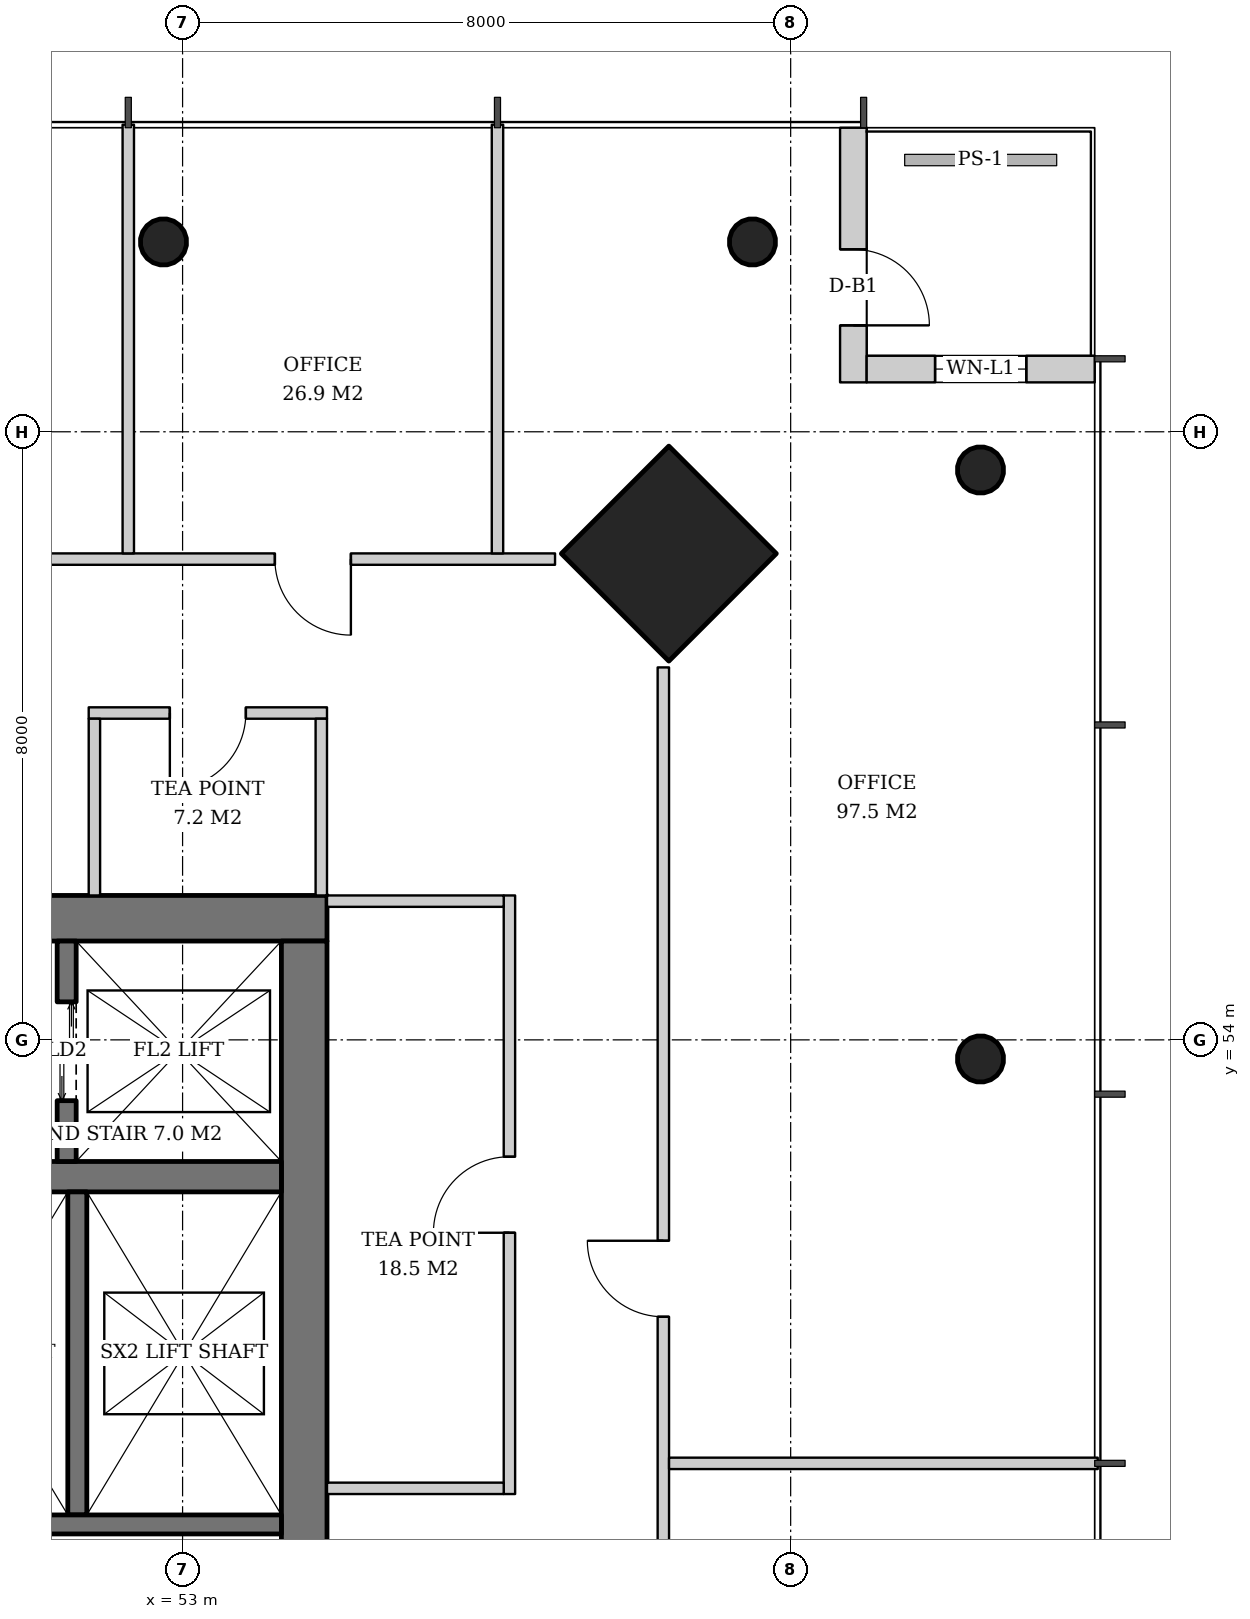
"""IFC4 building model, lengths in metres.
Left out: names, types, materials, properties, quantities, classifications, styles, units other than length and angle.
Written with IfcOpenShell. Run it as: python <this file> out.ifc"""

import sys

from ifc_helpers import new_model, si_unit, direction, frame, frame_2d, origin, origin_2d, place, context, subcontext, project, spatial, rectangle, hollow_circle, extrude, element, fill, save


model = new_model("IFC4")
c1 = context("Model", 3, precision=1e-05, world=origin(), true_north=direction((0.0, 1.0)))
c2 = subcontext(c1, "Body", "Model", "MODEL_VIEW")
j1 = project(units=[si_unit("LENGTHUNIT", "METRE"), si_unit("PLANEANGLEUNIT", "RADIAN")], contexts=[c1])
p1 = place(None, origin())
s1 = spatial("IfcSite", under=j1, at=p1, CompositionType="ELEMENT")
p2 = place(p1, origin())
s2 = spatial("IfcBuilding", under=s1, at=p2, CompositionType="ELEMENT")
p3 = place(p2, frame((0.0, 0.0, 192.0)))
s3 = spatial("IfcBuildingStorey", under=s2, at=p3, CompositionType="ELEMENT", Elevation=192.0)
p4 = place(p3, frame((59.436, 60.436, 0.0), z_axis=(-0.031962158256, -0.031962158256, 0.998977898093), x_axis=(0.707106781187, -0.707106781187, 0.0)))
e1 = element("IfcColumn", 1, at=p4, inside=s3, PredefinedType="COLUMN", context=c2, shape_type="SweptSolid", body=[
    extrude(rectangle(XDim=2.0, YDim=2.0, at=origin_2d()), origin(), (0.0, 0.0, 1.0), 3.804),
])
p5 = place(p3, frame((63.536, 61.536, 0.0), z_axis=(-0.031898107953, -0.031898107953, 0.998981992539), x_axis=(0.707106781187, -0.707106781187, 0.0)))
e2 = element("IfcColumn", 2, at=p5, inside=s3, PredefinedType="COLUMN", context=c2, shape_type="SweptSolid", body=[
    extrude(hollow_circle(Radius=0.305, WallThickness=0.025, at=origin_2d()), origin(), (0.0, 0.0, 1.0), 3.804),
])
p6 = place(p3, frame((63.536, 53.768, 0.0), z_axis=(-0.031910269556, -0.015987237665, 0.999362868496), x_axis=(0.447933021895, -0.894067115991, 0.0)))
e3 = element("IfcColumn", 3, at=p6, inside=s3, PredefinedType="COLUMN", context=c2, shape_type="SweptSolid", body=[
    extrude(hollow_circle(Radius=0.305, WallThickness=0.025, at=origin_2d()), origin(), (0.0, 0.0, 1.0), 3.802),
])
p7 = place(p3, frame((60.536, 64.536, 0.0), z_axis=(-0.031898107953, -0.031898107953, 0.998981992539), x_axis=(0.707106781187, -0.707106781187, 0.0)))
e4 = element("IfcColumn", 4, at=p7, inside=s3, PredefinedType="COLUMN", context=c2, shape_type="SweptSolid", body=[
    extrude(hollow_circle(Radius=0.305, WallThickness=0.025, at=origin_2d()), origin(), (0.0, 0.0, 1.0), 3.804),
])
p8 = place(p3, frame((52.768, 64.536, 0.0), z_axis=(-0.015987237665, -0.031910269556, 0.999362868496), x_axis=(0.894067115991, -0.447933021895, 0.0)))
e5 = element("IfcColumn", 5, at=p8, inside=s3, PredefinedType="COLUMN", context=c2, shape_type="SweptSolid", body=[
    extrude(hollow_circle(Radius=0.305, WallThickness=0.025, at=origin_2d()), origin(), (0.0, 0.0, 1.0), 3.802),
])
p9 = place(p3, frame((35.1, 55.6, 0.0), z_axis=(0.0, 0.0, 1.0), x_axis=(1.0, 0.0, 0.0)))
e6 = element("IfcWall", 6, at=p9, inside=s3, PredefinedType="SHEAR", context=c2, shape_type="SweptSolid", body=[
    extrude(rectangle(XDim=19.8, YDim=0.6, at=frame_2d((9.9, 0.0))), origin(), (0.0, 0.0, 1.0), 3.8),
])
p10 = place(p9, frame((14.54, 0.0, 0.0)))
e7 = element("IfcOpeningElement", 7, at=p10, cuts=e6, PredefinedType="OPENING", context=c2, shape_type="SweptSolid", body=[
    extrude(rectangle(XDim=1.0, YDim=2.1, at=frame_2d((0.5, 1.05))), frame((0.0, 0.31, 0.0), z_axis=(0.0, -1.0, 0.0), x_axis=(1.0, 0.0, 0.0)), (0.0, 0.0, 1.0), 0.62),
])
p11 = place(p9, frame((1.396, 0.0, 0.0)))
e8 = element("IfcOpeningElement", 8, at=p11, cuts=e6, PredefinedType="OPENING", context=c2, shape_type="SweptSolid", body=[
    extrude(rectangle(XDim=1.0, YDim=2.1, at=frame_2d((0.5, 1.05))), frame((0.0, 0.31, 0.0), z_axis=(0.0, -1.0, 0.0), x_axis=(1.0, 0.0, 0.0)), (0.0, 0.0, 1.0), 0.62),
])
p12 = place(p9, frame((3.448, 0.0, 0.0)))
e9 = element("IfcOpeningElement", 9, at=p12, cuts=e6, PredefinedType="OPENING", context=c2, shape_type="SweptSolid", body=[
    extrude(rectangle(XDim=1.0, YDim=2.1, at=frame_2d((0.5, 1.05))), frame((0.0, 0.31, 0.0), z_axis=(0.0, -1.0, 0.0), x_axis=(1.0, 0.0, 0.0)), (0.0, 0.0, 1.0), 0.62),
])
p13 = place(p3, frame((54.6, 36.7, 0.0), z_axis=(0.0, 0.0, 1.0), x_axis=(0.0, 1.0, 0.0)))
e10 = element("IfcWall", 10, at=p13, inside=s3, PredefinedType="SHEAR", context=c2, shape_type="SweptSolid", body=[
    extrude(rectangle(XDim=18.6, YDim=0.6, at=frame_2d((9.3, 0.0))), origin(), (0.0, 0.0, 1.0), 3.8),
])
p14 = place(p13, frame((8.4, 0.0, 0.0)))
e11 = element("IfcOpeningElement", 11, at=p14, cuts=e10, PredefinedType="OPENING", context=c2, shape_type="SweptSolid", body=[
    extrude(rectangle(XDim=1.8, YDim=2.4, at=frame_2d((0.9, 1.2))), frame((0.0, 0.31, 0.0), z_axis=(0.0, -1.0, 0.0), x_axis=(1.0, 0.0, 0.0)), (0.0, 0.0, 1.0), 0.62),
])
p15 = place(p3, frame((35.7, 52.2, 0.0), z_axis=(0.0, 0.0, 1.0), x_axis=(1.0, 0.0, 0.0)))
e12 = element("IfcWall", 12, at=p15, inside=s3, PredefinedType="SHEAR", context=c2, shape_type="SweptSolid", body=[
    extrude(rectangle(XDim=18.6, YDim=0.4, at=frame_2d((9.3, 0.0))), origin(), (0.0, 0.0, 1.0), 3.8),
])
p16 = place(p3, frame((61.825, 66.0, 0.0), z_axis=(0.0, 0.0, 1.0), x_axis=(0.0, -1.0, 0.0)))
e13 = element("IfcWall", 13, at=p16, inside=s3, PredefinedType="SOLIDWALL", context=c2, shape_type="SweptSolid", body=[
    extrude(rectangle(XDim=3.35, YDim=0.35, at=frame_2d((1.675, 0.0))), origin(), (0.0, 0.0, 1.0), 3.62),
])
p17 = place(p16, frame((1.6, 0.0, 0.0)))
e14 = element("IfcOpeningElement", 14, at=p17, cuts=e13, PredefinedType="OPENING", context=c2, shape_type="SweptSolid", body=[
    extrude(rectangle(XDim=1.0, YDim=2.4, at=frame_2d((0.5, 1.2))), frame((0.0, 0.185, 0.0), z_axis=(0.0, -1.0, 0.0), x_axis=(1.0, 0.0, 0.0)), (0.0, 0.0, 1.0), 0.37),
])
p18 = place(p3, frame((62.0, 62.825, 0.0), z_axis=(0.0, 0.0, 1.0), x_axis=(1.0, 0.0, 0.0)))
e15 = element("IfcWall", 15, at=p18, inside=s3, PredefinedType="SOLIDWALL", context=c2, shape_type="SweptSolid", body=[
    extrude(rectangle(XDim=3.0, YDim=0.35, at=frame_2d((1.5, 0.0))), origin(), (0.0, 0.0, 1.0), 3.62),
])
p19 = place(p18, frame((0.9, 0.0, 0.6)))
e16 = element("IfcOpeningElement", 16, at=p19, cuts=e15, PredefinedType="OPENING", context=c2, shape_type="SweptSolid", body=[
    extrude(rectangle(XDim=1.2, YDim=2.55, at=frame_2d((0.6, 1.275))), frame((0.0, 0.185, 0.0), z_axis=(0.0, -1.0, 0.0), x_axis=(1.0, 0.0, 0.0)), (0.0, 0.0, 1.0), 0.37),
])
p20 = place(p3, frame((51.475, 52.4, 0.0), z_axis=(0.0, 0.0, 1.0), x_axis=(0.0, 1.0, 0.0)))
e17 = element("IfcWall", 17, at=p20, inside=s3, PredefinedType="SHEAR", context=c2, shape_type="SweptSolid", body=[
    extrude(rectangle(XDim=2.9, YDim=0.25, at=frame_2d((1.45, 0.0))), origin(), (0.0, 0.0, 1.0), 3.8),
])
p21 = place(p20, frame((0.8, 0.0, 0.0)))
e18 = element("IfcOpeningElement", 18, at=p21, cuts=e17, PredefinedType="OPENING", context=c2, shape_type="SweptSolid", body=[
    extrude(rectangle(XDim=1.3, YDim=2.2, at=frame_2d((0.65, 1.1))), frame((0.0, 0.135, 0.0), z_axis=(0.0, -1.0, 0.0), x_axis=(1.0, 0.0, 0.0)), (0.0, 0.0, 1.0), 0.27),
])
p22 = place(p3, frame((51.615, 47.75, 0.0), z_axis=(0.0, 0.0, 1.0), x_axis=(0.0, 1.0, 0.0)))
e19 = element("IfcWall", 19, at=p22, inside=s3, PredefinedType="SHEAR", context=c2, shape_type="SweptSolid", body=[
    extrude(rectangle(XDim=4.25, YDim=0.25, at=frame_2d((2.125, 0.0))), origin(), (0.0, 0.0, 1.0), 3.8),
])
p23 = place(p3, frame((48.93, 47.625, 0.0), z_axis=(0.0, 0.0, 1.0), x_axis=(1.0, 0.0, 0.0)))
e20 = element("IfcWall", 20, at=p23, inside=s3, PredefinedType="SHEAR", context=c2, shape_type="SweptSolid", body=[
    extrude(rectangle(XDim=5.37, YDim=0.25, at=frame_2d((2.685, 0.0))), origin(), (0.0, 0.0, 1.0), 3.8),
])
p24 = place(p3, frame((57.3, 48.025, 0.0), z_axis=(0.0, 0.0, 1.0), x_axis=(0.0, 1.0, 0.0)))
e21 = element("IfcWall", 21, at=p24, inside=s3, PredefinedType="PARTITIONING", context=c2, shape_type="SweptSolid", body=[
    extrude(rectangle(XDim=7.875, YDim=0.15, at=frame_2d((3.938, 0.0))), origin(), (0.0, 0.0, 1.0), 2.867),
])
p25 = place(p24, frame((3.438, 0.0, 0.0)))
e22 = element("IfcOpeningElement", 22, at=p25, cuts=e21, PredefinedType="OPENING", context=c2, shape_type="SweptSolid", body=[
    extrude(rectangle(XDim=1.0, YDim=2.1, at=frame_2d((0.5, 1.05))), frame((0.0, 0.085, 0.0), z_axis=(0.0, -1.0, 0.0), x_axis=(1.0, 0.0, 0.0)), (0.0, 0.0, 1.0), 0.17),
])
for number, where, z_axis, x_axis in (
    (23, (54.9, 48.1, 0.0), (0.0, 0.0, 1.0), (1.0, 0.0, 0.0)),
    (24, (54.9, 55.825, 0.0), (0.0, 0.0, 1.0), (1.0, 0.0, 0.0)),
):
    element("IfcWall", number, at=place(p3, frame(where, z_axis=z_axis, x_axis=x_axis)), inside=s3, PredefinedType="PARTITIONING", context=c2, shape_type="SweptSolid", body=[
        extrude(rectangle(XDim=2.325, YDim=0.15, at=frame_2d((1.163, 0.0))), origin(), (0.0, 0.0, 1.0), 3.62),
    ])
p26 = place(p3, frame((54.9, 58.3, 0.0), z_axis=(0.0, 0.0, 1.0), x_axis=(-1.0, 0.0, 0.0)))
e25 = element("IfcWall", 25, at=p26, inside=s3, PredefinedType="PARTITIONING", context=c2, shape_type="SweptSolid", body=[
    extrude(rectangle(XDim=3.135, YDim=0.15, at=frame_2d((1.567, 0.0))), origin(), (0.0, 0.0, 1.0), 2.92),
])
p27 = place(p26, frame((1.067, 0.0, 0.0)))
e26 = element("IfcOpeningElement", 26, at=p27, cuts=e25, PredefinedType="OPENING", context=c2, shape_type="SweptSolid", body=[
    extrude(rectangle(XDim=1.0, YDim=2.1, at=frame_2d((0.5, 1.05))), frame((0.0, 0.085, 0.0), z_axis=(0.0, -1.0, 0.0), x_axis=(1.0, 0.0, 0.0)), (0.0, 0.0, 1.0), 0.17),
])
p28 = place(p3, frame((54.825, 55.9, 0.0), z_axis=(0.0, 0.0, 1.0), x_axis=(0.0, 1.0, 0.0)))
e27 = element("IfcWall", 27, at=p28, inside=s3, PredefinedType="PARTITIONING", context=c2, shape_type="SweptSolid", body=[
    extrude(rectangle(XDim=2.325, YDim=0.15, at=frame_2d((1.163, 0.0))), origin(), (0.0, 0.0, 1.0), 2.867),
])
p29 = place(p3, frame((51.84, 55.9, 0.0), z_axis=(0.0, 0.0, 1.0), x_axis=(0.0, 1.0, 0.0)))
e28 = element("IfcWall", 28, at=p29, inside=s3, PredefinedType="PARTITIONING", context=c2, shape_type="SweptSolid", body=[
    extrude(rectangle(XDim=2.325, YDim=0.15, at=frame_2d((1.163, 0.0))), origin(), (0.0, 0.0, 1.0), 3.62),
])
p30 = place(p3, frame((59.325, 33.1, 0.0), z_axis=(0.0, 0.0, 1.0), x_axis=(0.0, 1.0, 0.0)))
e29 = element("IfcWall", 29, at=p30, inside=s3, PredefinedType="PARTITIONING", context=c2, shape_type="SweptSolid", body=[
    extrude(rectangle(XDim=25.8, YDim=0.15, at=frame_2d((12.9, 0.0))), origin(), (0.0, 0.0, 1.0), 2.867),
])
p31 = place(p30, frame((2.686, 0.0, 0.0)))
e30 = element("IfcOpeningElement", 30, at=p31, cuts=e29, PredefinedType="OPENING", context=c2, shape_type="SweptSolid", body=[
    extrude(rectangle(XDim=1.0, YDim=2.1, at=frame_2d((0.5, 1.05))), frame((0.0, 0.085, 0.0), z_axis=(0.0, -1.0, 0.0), x_axis=(1.0, 0.0, 0.0)), (0.0, 0.0, 1.0), 0.17),
])
p32 = place(p30, frame((7.543, 0.0, 0.0)))
e31 = element("IfcOpeningElement", 31, at=p32, cuts=e29, PredefinedType="OPENING", context=c2, shape_type="SweptSolid", body=[
    extrude(rectangle(XDim=1.0, YDim=2.1, at=frame_2d((0.5, 1.05))), frame((0.0, 0.085, 0.0), z_axis=(0.0, -1.0, 0.0), x_axis=(1.0, 0.0, 0.0)), (0.0, 0.0, 1.0), 0.17),
])
p33 = place(p30, frame((12.4, 0.0, 0.0)))
e32 = element("IfcOpeningElement", 32, at=p33, cuts=e29, PredefinedType="OPENING", context=c2, shape_type="SweptSolid", body=[
    extrude(rectangle(XDim=1.0, YDim=2.1, at=frame_2d((0.5, 1.05))), frame((0.0, 0.085, 0.0), z_axis=(0.0, -1.0, 0.0), x_axis=(1.0, 0.0, 0.0)), (0.0, 0.0, 1.0), 0.17),
])
p34 = place(p30, frame((17.257, 0.0, 0.0)))
e33 = element("IfcOpeningElement", 33, at=p34, cuts=e29, PredefinedType="OPENING", context=c2, shape_type="SweptSolid", body=[
    extrude(rectangle(XDim=1.0, YDim=2.1, at=frame_2d((0.5, 1.05))), frame((0.0, 0.085, 0.0), z_axis=(0.0, -1.0, 0.0), x_axis=(1.0, 0.0, 0.0)), (0.0, 0.0, 1.0), 0.17),
])
p35 = place(p3, frame((59.4, 48.428, 0.0), z_axis=(0.0, 0.0, 1.0), x_axis=(1.0, 0.0, 0.0)))
e34 = element("IfcWall", 34, at=p35, inside=s3, PredefinedType="PARTITIONING", context=c2, shape_type="SweptSolid", body=[
    extrude(rectangle(XDim=5.64, YDim=0.15, at=frame_2d((2.82, 0.0))), origin(), (0.0, 0.0, 1.0), 2.867),
])
p36 = place(p3, frame((57.9, 60.325, 0.0), z_axis=(0.0, 0.0, 1.0), x_axis=(-1.0, 0.0, 0.0)))
e35 = element("IfcWall", 35, at=p36, inside=s3, PredefinedType="PARTITIONING", context=c2, shape_type="SweptSolid", body=[
    extrude(rectangle(XDim=25.8, YDim=0.15, at=frame_2d((12.9, 0.0))), origin(), (0.0, 0.0, 1.0), 2.867),
])
p37 = place(p36, frame((2.686, 0.0, 0.0)))
e36 = element("IfcOpeningElement", 36, at=p37, cuts=e35, PredefinedType="OPENING", context=c2, shape_type="SweptSolid", body=[
    extrude(rectangle(XDim=1.0, YDim=2.1, at=frame_2d((0.5, 1.05))), frame((0.0, 0.085, 0.0), z_axis=(0.0, -1.0, 0.0), x_axis=(1.0, 0.0, 0.0)), (0.0, 0.0, 1.0), 0.17),
])
p38 = place(p36, frame((7.543, 0.0, 0.0)))
e37 = element("IfcOpeningElement", 37, at=p38, cuts=e35, PredefinedType="OPENING", context=c2, shape_type="SweptSolid", body=[
    extrude(rectangle(XDim=1.0, YDim=2.1, at=frame_2d((0.5, 1.05))), frame((0.0, 0.085, 0.0), z_axis=(0.0, -1.0, 0.0), x_axis=(1.0, 0.0, 0.0)), (0.0, 0.0, 1.0), 0.17),
])
p39 = place(p36, frame((12.4, 0.0, 0.0)))
e38 = element("IfcOpeningElement", 38, at=p39, cuts=e35, PredefinedType="OPENING", context=c2, shape_type="SweptSolid", body=[
    extrude(rectangle(XDim=1.0, YDim=2.1, at=frame_2d((0.5, 1.05))), frame((0.0, 0.085, 0.0), z_axis=(0.0, -1.0, 0.0), x_axis=(1.0, 0.0, 0.0)), (0.0, 0.0, 1.0), 0.17),
])
p40 = place(p36, frame((17.257, 0.0, 0.0)))
e39 = element("IfcOpeningElement", 39, at=p40, cuts=e35, PredefinedType="OPENING", context=c2, shape_type="SweptSolid", body=[
    extrude(rectangle(XDim=1.0, YDim=2.1, at=frame_2d((0.5, 1.05))), frame((0.0, 0.085, 0.0), z_axis=(0.0, -1.0, 0.0), x_axis=(1.0, 0.0, 0.0)), (0.0, 0.0, 1.0), 0.17),
])
for number, where, z_axis, x_axis in (
    (40, (57.143, 60.4, 0.0), (0.0, 0.0, 1.0), (0.0, 1.0, 0.0)),
    (41, (52.286, 60.4, 0.0), (0.0, 0.0, 1.0), (0.0, 1.0, 0.0)),
):
    element("IfcWall", number, at=place(p3, frame(where, z_axis=z_axis, x_axis=x_axis)), inside=s3, PredefinedType="PARTITIONING", context=c2, shape_type="SweptSolid", body=[
        extrude(rectangle(XDim=5.64, YDim=0.15, at=frame_2d((2.82, 0.0))), origin(), (0.0, 0.0, 1.0), 3.12),
    ])
p41 = place(p17, origin())
e42 = element("IfcDoor", 42, at=p41, inside=s3, OperationType="SINGLE_SWING_RIGHT", PredefinedType="DOOR", context=c2, shape_type="SweptSolid", body=[
    extrude(rectangle(XDim=1.0, YDim=2.4, at=frame_2d((0.5, 1.2))), frame((0.0, 0.025, 0.0), z_axis=(0.0, -1.0, 0.0), x_axis=(1.0, 0.0, 0.0)), (0.0, 0.0, 1.0), 0.05),
])
fill(e14, e42)
p42 = place(p19, origin())
e43 = element("IfcWindow", 43, at=p42, inside=s3, PartitioningType="SINGLE_PANEL", PredefinedType="WINDOW", context=c2, shape_type="SweptSolid", body=[
    extrude(rectangle(XDim=1.2, YDim=2.55, at=frame_2d((0.6, 1.275))), frame((0.0, 0.03, 0.0), z_axis=(0.0, -1.0, 0.0), x_axis=(1.0, 0.0, 0.0)), (0.0, 0.0, 1.0), 0.06),
])
fill(e16, e43)
p43 = place(p21, origin())
e44 = element("IfcDoor", 44, at=p43, inside=s3, OperationType="DOUBLE_DOOR_SLIDING", PredefinedType="DOOR", context=c2, shape_type="SweptSolid", body=[
    extrude(rectangle(XDim=1.3, YDim=2.2, at=frame_2d((0.65, 1.1))), frame((0.0, 0.025, 0.0), z_axis=(0.0, -1.0, 0.0), x_axis=(1.0, 0.0, 0.0)), (0.0, 0.0, 1.0), 0.05),
])
fill(e18, e44)
p44 = place(p25, origin())
e45 = element("IfcDoor", 45, at=p44, inside=s3, OperationType="SINGLE_SWING_LEFT", PredefinedType="DOOR", context=c2, shape_type="SweptSolid", body=[
    extrude(rectangle(XDim=1.0, YDim=2.1, at=frame_2d((0.5, 1.05))), frame((0.0, 0.025, 0.0), z_axis=(0.0, -1.0, 0.0), x_axis=(1.0, 0.0, 0.0)), (0.0, 0.0, 1.0), 0.05),
])
fill(e22, e45)
p45 = place(p27, origin())
e46 = element("IfcDoor", 46, at=p45, inside=s3, OperationType="SINGLE_SWING_RIGHT", PredefinedType="DOOR", context=c2, shape_type="SweptSolid", body=[
    extrude(rectangle(XDim=1.0, YDim=2.1, at=frame_2d((0.5, 1.05))), frame((0.0, 0.025, 0.0), z_axis=(0.0, -1.0, 0.0), x_axis=(1.0, 0.0, 0.0)), (0.0, 0.0, 1.0), 0.05),
])
fill(e26, e46)
p46 = place(p34, origin())
e47 = element("IfcDoor", 47, at=p46, inside=s3, OperationType="SINGLE_SWING_RIGHT", PredefinedType="DOOR", context=c2, shape_type="SweptSolid", body=[
    extrude(rectangle(XDim=1.0, YDim=2.1, at=frame_2d((0.5, 1.05))), frame((0.0, 0.025, 0.0), z_axis=(0.0, -1.0, 0.0), x_axis=(1.0, 0.0, 0.0)), (0.0, 0.0, 1.0), 0.05),
])
fill(e33, e47)
p47 = place(p37, origin())
e48 = element("IfcDoor", 48, at=p47, inside=s3, OperationType="SINGLE_SWING_LEFT", PredefinedType="DOOR", context=c2, shape_type="SweptSolid", body=[
    extrude(rectangle(XDim=1.0, YDim=2.1, at=frame_2d((0.5, 1.05))), frame((0.0, 0.025, 0.0), z_axis=(0.0, -1.0, 0.0), x_axis=(1.0, 0.0, 0.0)), (0.0, 0.0, 1.0), 0.05),
])
fill(e36, e48)
save(model, sys.argv[1])
